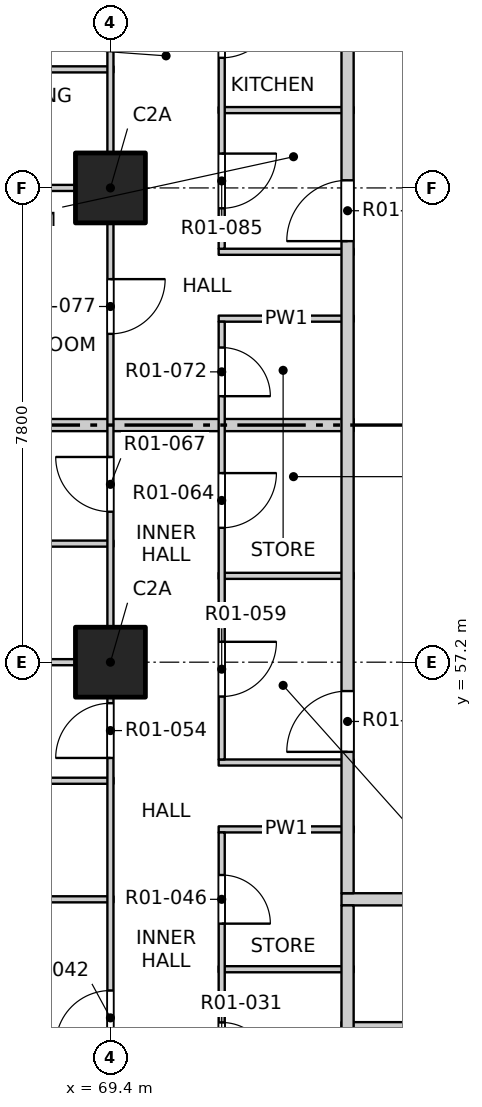
"""IFC4 building model, lengths in metres.
Left out: names, types, materials, properties, quantities, classifications, styles, units other than length and angle.
Written with IfcOpenShell. Run it as: python <this file> out.ifc"""

import sys

from ifc_helpers import new_model, si_unit, direction, frame, frame_2d, origin, origin_2d, place, context, subcontext, project, spatial, rectangle, extrude, element, fill, save


model = new_model("IFC4")
c1 = context("Model", 3, precision=1e-05, world=origin(), true_north=direction((0.0, 1.0)))
c2 = subcontext(c1, "Body", "Model", "MODEL_VIEW")
j1 = project(units=[si_unit("LENGTHUNIT", "METRE"), si_unit("PLANEANGLEUNIT", "RADIAN")], contexts=[c1])
p1 = place(None, origin())
s1 = spatial("IfcSite", under=j1, at=p1, CompositionType="ELEMENT")
p2 = place(p1, origin())
s2 = spatial("IfcBuilding", under=s1, at=p2, CompositionType="ELEMENT")
p3 = place(p2, frame((0.0, 0.0, 19.5)))
s3 = spatial("IfcBuildingStorey", under=s2, at=p3, CompositionType="ELEMENT", Elevation=19.5)
for number, where, z_axis, x_axis in (
    (1, (69.4, 57.2, -0.25), (0.0, 0.0, 1.0), (1.0, 0.0, 0.0)),
    (2, (69.4, 65.0, -0.25), (0.0, 0.0, 1.0), (1.0, 0.0, 0.0)),
):
    element("IfcColumn", number, at=place(p3, frame(where, z_axis=z_axis, x_axis=x_axis)), inside=s3, PredefinedType="COLUMN", context=c2, shape_type="SweptSolid", body=[
        extrude(rectangle(XDim=1.15, YDim=1.15, at=origin_2d()), origin(), (0.0, 0.0, 1.0), 3.4),
    ])
p4 = place(p3, frame((73.2, 51.23, 0.0), z_axis=(0.0, 0.0, 1.0), x_axis=(1.0, 0.0, 0.0)))
e3 = element("IfcWall", 3, at=p4, inside=s3, PredefinedType="PARTITIONING", context=c2, shape_type="SweptSolid", body=[
    extrude(rectangle(XDim=5.3, YDim=0.1, at=frame_2d((2.65, 0.0))), origin(), (0.0, 0.0, 1.0), 3.15),
])
p5 = place(p4, frame((1.05, 0.0, 0.0)))
e4 = element("IfcOpeningElement", 4, at=p5, cuts=e3, PredefinedType="OPENING", context=c2, shape_type="SweptSolid", body=[
    extrude(rectangle(XDim=0.8, YDim=2.1, at=frame_2d((0.4, 1.05))), frame((0.0, 0.06, 0.0), z_axis=(0.0, -1.0, 0.0), x_axis=(1.0, 0.0, 0.0)), (0.0, 0.0, 1.0), 0.12),
])
p6 = place(p4, frame((3.625, 0.0, 0.0)))
e5 = element("IfcOpeningElement", 5, at=p6, cuts=e3, PredefinedType="OPENING", context=c2, shape_type="SweptSolid", body=[
    extrude(rectangle(XDim=0.8, YDim=2.1, at=frame_2d((0.4, 1.05))), frame((0.0, 0.06, 0.0), z_axis=(0.0, -1.0, 0.0), x_axis=(1.0, 0.0, 0.0)), (0.0, 0.0, 1.0), 0.12),
])
p7 = place(p3, frame((71.18, 52.15, 0.0), z_axis=(0.0, 0.0, 1.0), x_axis=(1.0, 0.0, 0.0)))
e6 = element("IfcWall", 6, at=p7, inside=s3, PredefinedType="PARTITIONING", context=c2, shape_type="SweptSolid", body=[
    extrude(rectangle(XDim=2.22, YDim=0.1, at=frame_2d((1.11, 0.0))), origin(), (0.0, 0.0, 1.0), 3.15),
])
p8 = place(p3, frame((61.9, 53.3, 0.0), z_axis=(0.0, 0.0, 1.0), x_axis=(1.0, 0.0, 0.0)))
e7 = element("IfcWall", 7, at=p8, inside=s3, PredefinedType="PARTITIONING", context=c2, shape_type="SweptSolid", body=[
    extrude(rectangle(XDim=7.55, YDim=0.1, at=frame_2d((3.775, 0.0))), origin(), (0.0, 0.0, 1.0), 3.15),
])
p9 = place(p3, frame((73.2, 53.3, 0.0), z_axis=(0.0, 0.0, 1.0), x_axis=(1.0, 0.0, 0.0)))
e8 = element("IfcWall", 8, at=p9, inside=s3, PredefinedType="PARTITIONING", context=c2, shape_type="SweptSolid", body=[
    extrude(rectangle(XDim=23.6, YDim=0.2, at=frame_2d((11.8, 0.0))), origin(), (0.0, 0.0, 1.0), 3.15),
])
p10 = place(p9, frame((6.525, 0.0, 0.0)))
e9 = element("IfcOpeningElement", 9, at=p10, cuts=e8, PredefinedType="OPENING", context=c2, shape_type="SweptSolid", body=[
    extrude(rectangle(XDim=1.0, YDim=2.1, at=frame_2d((0.5, 1.05))), frame((0.0, 0.11, 0.0), z_axis=(0.0, -1.0, 0.0), x_axis=(1.0, 0.0, 0.0)), (0.0, 0.0, 1.0), 0.22),
])
p11 = place(p9, frame((18.275, 0.0, 0.0)))
e10 = element("IfcOpeningElement", 10, at=p11, cuts=e8, PredefinedType="OPENING", context=c2, shape_type="SweptSolid", body=[
    extrude(rectangle(XDim=1.0, YDim=2.1, at=frame_2d((0.5, 1.05))), frame((0.0, 0.11, 0.0), z_axis=(0.0, -1.0, 0.0), x_axis=(1.0, 0.0, 0.0)), (0.0, 0.0, 1.0), 0.22),
])
p12 = place(p3, frame((71.18, 54.45, 0.0), z_axis=(0.0, 0.0, 1.0), x_axis=(1.0, 0.0, 0.0)))
e11 = element("IfcWall", 11, at=p12, inside=s3, PredefinedType="PARTITIONING", context=c2, shape_type="SweptSolid", body=[
    extrude(rectangle(XDim=2.22, YDim=0.1, at=frame_2d((1.11, 0.0))), origin(), (0.0, 0.0, 1.0), 3.15),
])
p13 = place(p3, frame((65.75, 55.25, 0.0), z_axis=(0.0, 0.0, 1.0), x_axis=(1.0, 0.0, 0.0)))
e12 = element("IfcWall", 12, at=p13, inside=s3, PredefinedType="PARTITIONING", context=c2, shape_type="SweptSolid", body=[
    extrude(rectangle(XDim=3.7, YDim=0.1, at=frame_2d((1.85, 0.0))), origin(), (0.0, 0.0, 1.0), 3.15),
])
p14 = place(p3, frame((71.18, 55.55, 0.0), z_axis=(0.0, 0.0, 1.0), x_axis=(1.0, 0.0, 0.0)))
e13 = element("IfcWall", 13, at=p14, inside=s3, PredefinedType="PARTITIONING", context=c2, shape_type="SweptSolid", body=[
    extrude(rectangle(XDim=2.22, YDim=0.1, at=frame_2d((1.11, 0.0))), origin(), (0.0, 0.0, 1.0), 3.15),
])
p15 = place(p3, frame((61.9, 57.2, 0.0), z_axis=(0.0, 0.0, 1.0), x_axis=(1.0, 0.0, 0.0)))
e14 = element("IfcWall", 14, at=p15, inside=s3, PredefinedType="PARTITIONING", context=c2, shape_type="SweptSolid", body=[
    extrude(rectangle(XDim=7.55, YDim=0.1, at=frame_2d((3.775, 0.0))), origin(), (0.0, 0.0, 1.0), 2.55),
])
p16 = place(p3, frame((71.18, 58.62, 0.0), z_axis=(0.0, 0.0, 1.0), x_axis=(1.0, 0.0, 0.0)))
e15 = element("IfcWall", 15, at=p16, inside=s3, PredefinedType="PARTITIONING", context=c2, shape_type="SweptSolid", body=[
    extrude(rectangle(XDim=2.22, YDim=0.1, at=frame_2d((1.11, 0.0))), origin(), (0.0, 0.0, 1.0), 3.15),
])
p17 = place(p3, frame((65.75, 59.15, 0.0), z_axis=(0.0, 0.0, 1.0), x_axis=(1.0, 0.0, 0.0)))
e16 = element("IfcWall", 16, at=p17, inside=s3, PredefinedType="PARTITIONING", context=c2, shape_type="SweptSolid", body=[
    extrude(rectangle(XDim=3.7, YDim=0.1, at=frame_2d((1.85, 0.0))), origin(), (0.0, 0.0, 1.0), 3.15),
])
p18 = place(p3, frame((61.9, 61.1, 0.0), z_axis=(0.0, 0.0, 1.0), x_axis=(1.0, 0.0, 0.0)))
e17 = element("IfcWall", 17, at=p18, inside=s3, PredefinedType="PARTITIONING", context=c2, shape_type="SweptSolid", body=[
    extrude(rectangle(XDim=11.5, YDim=0.2, at=frame_2d((5.75, 0.0))), origin(), (0.0, 0.0, 1.0), 3.15),
])
for number, where, z_axis, x_axis in (
    (18, (71.18, 62.85, 0.0), (0.0, 0.0, 1.0), (1.0, 0.0, 0.0)),
    (19, (71.18, 63.95, 0.0), (0.0, 0.0, 1.0), (1.0, 0.0, 0.0)),
):
    element("IfcWall", number, at=place(p3, frame(where, z_axis=z_axis, x_axis=x_axis)), inside=s3, PredefinedType="PARTITIONING", context=c2, shape_type="SweptSolid", body=[
        extrude(rectangle(XDim=2.22, YDim=0.1, at=frame_2d((1.11, 0.0))), origin(), (0.0, 0.0, 1.0), 3.15),
    ])
p19 = place(p3, frame((61.9, 65.0, 0.0), z_axis=(0.0, 0.0, 1.0), x_axis=(1.0, 0.0, 0.0)))
e20 = element("IfcWall", 20, at=p19, inside=s3, PredefinedType="PARTITIONING", context=c2, shape_type="SweptSolid", body=[
    extrude(rectangle(XDim=7.55, YDim=0.1, at=frame_2d((3.775, 0.0))), origin(), (0.0, 0.0, 1.0), 2.55),
])
p20 = place(p3, frame((71.18, 66.28, 0.0), z_axis=(0.0, 0.0, 1.0), x_axis=(1.0, 0.0, 0.0)))
e21 = element("IfcWall", 21, at=p20, inside=s3, PredefinedType="PARTITIONING", context=c2, shape_type="SweptSolid", body=[
    extrude(rectangle(XDim=2.22, YDim=0.1, at=frame_2d((1.11, 0.0))), origin(), (0.0, 0.0, 1.0), 3.15),
])
p21 = place(p3, frame((66.05, 66.95, 0.0), z_axis=(0.0, 0.0, 1.0), x_axis=(1.0, 0.0, 0.0)))
e22 = element("IfcWall", 22, at=p21, inside=s3, PredefinedType="PARTITIONING", context=c2, shape_type="SweptSolid", body=[
    extrude(rectangle(XDim=3.4, YDim=0.1, at=frame_2d((1.7, 0.0))), origin(), (0.0, 0.0, 1.0), 3.15),
])
p22 = place(p3, frame((69.4, 49.4, 0.0), z_axis=(0.0, 0.0, 1.0), x_axis=(0.0, 1.0, 0.0)))
e23 = element("IfcWall", 23, at=p22, inside=s3, PredefinedType="PARTITIONING", context=c2, shape_type="SweptSolid", body=[
    extrude(rectangle(XDim=31.2, YDim=0.1, at=frame_2d((15.6, 0.0))), origin(), (0.0, 0.0, 1.0), 3.15),
])
p23 = place(p22, frame((1.5, 0.0, 0.0)))
e24 = element("IfcOpeningElement", 24, at=p23, cuts=e23, PredefinedType="OPENING", context=c2, shape_type="SweptSolid", body=[
    extrude(rectangle(XDim=0.9, YDim=2.1, at=frame_2d((0.45, 1.05))), frame((0.0, 0.06, 0.0), z_axis=(0.0, -1.0, 0.0), x_axis=(1.0, 0.0, 0.0)), (0.0, 0.0, 1.0), 0.12),
])
p24 = place(p22, frame((6.225, 0.0, 0.0)))
e25 = element("IfcOpeningElement", 25, at=p24, cuts=e23, PredefinedType="OPENING", context=c2, shape_type="SweptSolid", body=[
    extrude(rectangle(XDim=0.9, YDim=2.1, at=frame_2d((0.45, 1.05))), frame((0.0, 0.06, 0.0), z_axis=(0.0, -1.0, 0.0), x_axis=(1.0, 0.0, 0.0)), (0.0, 0.0, 1.0), 0.12),
])
p25 = place(p22, frame((10.275, 0.0, 0.0)))
e26 = element("IfcOpeningElement", 26, at=p25, cuts=e23, PredefinedType="OPENING", context=c2, shape_type="SweptSolid", body=[
    extrude(rectangle(XDim=0.9, YDim=2.1, at=frame_2d((0.45, 1.05))), frame((0.0, 0.06, 0.0), z_axis=(0.0, -1.0, 0.0), x_axis=(1.0, 0.0, 0.0)), (0.0, 0.0, 1.0), 0.12),
])
p26 = place(p22, frame((13.2, 0.0, 0.0)))
e27 = element("IfcOpeningElement", 27, at=p26, cuts=e23, PredefinedType="OPENING", context=c2, shape_type="SweptSolid", body=[
    extrude(rectangle(XDim=0.9, YDim=2.1, at=frame_2d((0.45, 1.05))), frame((0.0, 0.06, 0.0), z_axis=(0.0, -1.0, 0.0), x_axis=(1.0, 0.0, 0.0)), (0.0, 0.0, 1.0), 0.12),
])
p27 = place(p22, frame((18.075, 0.0, 0.0)))
e28 = element("IfcOpeningElement", 28, at=p27, cuts=e23, PredefinedType="OPENING", context=c2, shape_type="SweptSolid", body=[
    extrude(rectangle(XDim=0.9, YDim=2.1, at=frame_2d((0.45, 1.05))), frame((0.0, 0.06, 0.0), z_axis=(0.0, -1.0, 0.0), x_axis=(1.0, 0.0, 0.0)), (0.0, 0.0, 1.0), 0.12),
])
p28 = place(p22, frame((21.8, 0.0, 0.0)))
e29 = element("IfcOpeningElement", 29, at=p28, cuts=e23, PredefinedType="OPENING", context=c2, shape_type="SweptSolid", body=[
    extrude(rectangle(XDim=0.9, YDim=2.1, at=frame_2d((0.45, 1.05))), frame((0.0, 0.06, 0.0), z_axis=(0.0, -1.0, 0.0), x_axis=(1.0, 0.0, 0.0)), (0.0, 0.0, 1.0), 0.12),
])
p29 = place(p22, frame((24.9, 0.0, 0.0)))
e30 = element("IfcOpeningElement", 30, at=p29, cuts=e23, PredefinedType="OPENING", context=c2, shape_type="SweptSolid", body=[
    extrude(rectangle(XDim=0.9, YDim=2.1, at=frame_2d((0.45, 1.05))), frame((0.0, 0.06, 0.0), z_axis=(0.0, -1.0, 0.0), x_axis=(1.0, 0.0, 0.0)), (0.0, 0.0, 1.0), 0.12),
])
p30 = place(p22, frame((29.6, 0.0, 0.0)))
e31 = element("IfcOpeningElement", 31, at=p30, cuts=e23, PredefinedType="OPENING", context=c2, shape_type="SweptSolid", body=[
    extrude(rectangle(XDim=0.9, YDim=2.1, at=frame_2d((0.45, 1.05))), frame((0.0, 0.06, 0.0), z_axis=(0.0, -1.0, 0.0), x_axis=(1.0, 0.0, 0.0)), (0.0, 0.0, 1.0), 0.12),
])
p31 = place(p3, frame((71.23, 45.55, 0.0), z_axis=(0.0, 0.0, 1.0), x_axis=(0.0, 1.0, 0.0)))
e32 = element("IfcWall", 32, at=p31, inside=s3, PredefinedType="PARTITIONING", context=c2, shape_type="SweptSolid", body=[
    extrude(rectangle(XDim=8.85, YDim=0.1, at=frame_2d((4.425, 0.0))), origin(), (0.0, 0.0, 1.0), 3.15),
])
p32 = place(p31, frame((0.7, 0.0, 0.0)))
e33 = element("IfcOpeningElement", 33, at=p32, cuts=e32, PredefinedType="OPENING", context=c2, shape_type="SweptSolid", body=[
    extrude(rectangle(XDim=0.8, YDim=2.1, at=frame_2d((0.4, 1.05))), frame((0.0, 0.06, 0.0), z_axis=(0.0, -1.0, 0.0), x_axis=(1.0, 0.0, 0.0)), (0.0, 0.0, 1.0), 0.12),
])
p33 = place(p31, frame((2.7, 0.0, 0.0)))
e34 = element("IfcOpeningElement", 34, at=p33, cuts=e32, PredefinedType="OPENING", context=c2, shape_type="SweptSolid", body=[
    extrude(rectangle(XDim=0.9, YDim=2.1, at=frame_2d((0.45, 1.05))), frame((0.0, 0.06, 0.0), z_axis=(0.0, -1.0, 0.0), x_axis=(1.0, 0.0, 0.0)), (0.0, 0.0, 1.0), 0.12),
])
p34 = place(p31, frame((4.925, 0.0, 0.0)))
e35 = element("IfcOpeningElement", 35, at=p34, cuts=e32, PredefinedType="OPENING", context=c2, shape_type="SweptSolid", body=[
    extrude(rectangle(XDim=0.8, YDim=2.1, at=frame_2d((0.4, 1.05))), frame((0.0, 0.06, 0.0), z_axis=(0.0, -1.0, 0.0), x_axis=(1.0, 0.0, 0.0)), (0.0, 0.0, 1.0), 0.12),
])
p35 = place(p31, frame((7.35, 0.0, 0.0)))
e36 = element("IfcOpeningElement", 36, at=p35, cuts=e32, PredefinedType="OPENING", context=c2, shape_type="SweptSolid", body=[
    extrude(rectangle(XDim=0.8, YDim=2.1, at=frame_2d((0.4, 1.05))), frame((0.0, 0.06, 0.0), z_axis=(0.0, -1.0, 0.0), x_axis=(1.0, 0.0, 0.0)), (0.0, 0.0, 1.0), 0.12),
])
p36 = place(p3, frame((71.23, 55.6, 0.0), z_axis=(0.0, 0.0, 1.0), x_axis=(0.0, 1.0, 0.0)))
e37 = element("IfcWall", 37, at=p36, inside=s3, PredefinedType="PARTITIONING", context=c2, shape_type="SweptSolid", body=[
    extrude(rectangle(XDim=7.2, YDim=0.1, at=frame_2d((3.6, 0.0))), origin(), (0.0, 0.0, 1.0), 3.15),
])
p37 = place(p36, frame((1.035, 0.0, 0.0)))
e38 = element("IfcOpeningElement", 38, at=p37, cuts=e37, PredefinedType="OPENING", context=c2, shape_type="SweptSolid", body=[
    extrude(rectangle(XDim=0.9, YDim=2.1, at=frame_2d((0.45, 1.05))), frame((0.0, 0.06, 0.0), z_axis=(0.0, -1.0, 0.0), x_axis=(1.0, 0.0, 0.0)), (0.0, 0.0, 1.0), 0.12),
])
p38 = place(p36, frame((3.81, 0.0, 0.0)))
e39 = element("IfcOpeningElement", 39, at=p38, cuts=e37, PredefinedType="OPENING", context=c2, shape_type="SweptSolid", body=[
    extrude(rectangle(XDim=0.9, YDim=2.1, at=frame_2d((0.45, 1.05))), frame((0.0, 0.06, 0.0), z_axis=(0.0, -1.0, 0.0), x_axis=(1.0, 0.0, 0.0)), (0.0, 0.0, 1.0), 0.12),
])
p39 = place(p36, frame((5.975, 0.0, 0.0)))
e40 = element("IfcOpeningElement", 40, at=p39, cuts=e37, PredefinedType="OPENING", context=c2, shape_type="SweptSolid", body=[
    extrude(rectangle(XDim=0.8, YDim=2.1, at=frame_2d((0.4, 1.05))), frame((0.0, 0.06, 0.0), z_axis=(0.0, -1.0, 0.0), x_axis=(1.0, 0.0, 0.0)), (0.0, 0.0, 1.0), 0.12),
])
p40 = place(p3, frame((71.23, 64.0, 0.0), z_axis=(0.0, 0.0, 1.0), x_axis=(0.0, 1.0, 0.0)))
e41 = element("IfcWall", 41, at=p40, inside=s3, PredefinedType="PARTITIONING", context=c2, shape_type="SweptSolid", body=[
    extrude(rectangle(XDim=6.3, YDim=0.1, at=frame_2d((3.15, 0.0))), origin(), (0.0, 0.0, 1.0), 3.15),
])
p41 = place(p40, frame((0.665, 0.0, 0.0)))
e42 = element("IfcOpeningElement", 42, at=p41, cuts=e41, PredefinedType="OPENING", context=c2, shape_type="SweptSolid", body=[
    extrude(rectangle(XDim=0.9, YDim=2.1, at=frame_2d((0.45, 1.05))), frame((0.0, 0.06, 0.0), z_axis=(0.0, -1.0, 0.0), x_axis=(1.0, 0.0, 0.0)), (0.0, 0.0, 1.0), 0.12),
])
p42 = place(p40, frame((3.14, 0.0, 0.0)))
e43 = element("IfcOpeningElement", 43, at=p42, cuts=e41, PredefinedType="OPENING", context=c2, shape_type="SweptSolid", body=[
    extrude(rectangle(XDim=0.9, YDim=2.1, at=frame_2d((0.45, 1.05))), frame((0.0, 0.06, 0.0), z_axis=(0.0, -1.0, 0.0), x_axis=(1.0, 0.0, 0.0)), (0.0, 0.0, 1.0), 0.12),
])
p43 = place(p40, frame((5.175, 0.0, 0.0)))
e44 = element("IfcOpeningElement", 44, at=p43, cuts=e41, PredefinedType="OPENING", context=c2, shape_type="SweptSolid", body=[
    extrude(rectangle(XDim=0.9, YDim=2.1, at=frame_2d((0.45, 1.05))), frame((0.0, 0.06, 0.0), z_axis=(0.0, -1.0, 0.0), x_axis=(1.0, 0.0, 0.0)), (0.0, 0.0, 1.0), 0.12),
])
p44 = place(p3, frame((73.3, 41.9, 0.0), z_axis=(0.0, 0.0, 1.0), x_axis=(0.0, 1.0, 0.0)))
e45 = element("IfcWall", 45, at=p44, inside=s3, PredefinedType="PARTITIONING", context=c2, shape_type="SweptSolid", body=[
    extrude(rectangle(XDim=11.3, YDim=0.2, at=frame_2d((5.65, 0.0))), origin(), (0.0, 0.0, 1.0), 3.15),
])
p45 = place(p3, frame((73.3, 53.4, 0.0), z_axis=(0.0, 0.0, 1.0), x_axis=(0.0, 1.0, 0.0)))
e46 = element("IfcWall", 46, at=p45, inside=s3, PredefinedType="PARTITIONING", context=c2, shape_type="SweptSolid", body=[
    extrude(rectangle(XDim=31.0, YDim=0.2, at=frame_2d((15.5, 0.0))), origin(), (0.0, 0.0, 1.0), 3.15),
])
p46 = place(p45, frame((2.325, 0.0, 0.0)))
e47 = element("IfcOpeningElement", 47, at=p46, cuts=e46, PredefinedType="OPENING", context=c2, shape_type="SweptSolid", body=[
    extrude(rectangle(XDim=1.0, YDim=2.1, at=frame_2d((0.5, 1.05))), frame((0.0, 0.11, 0.0), z_axis=(0.0, -1.0, 0.0), x_axis=(1.0, 0.0, 0.0)), (0.0, 0.0, 1.0), 0.22),
])
p47 = place(p45, frame((10.725, 0.0, 0.0)))
e48 = element("IfcOpeningElement", 48, at=p47, cuts=e46, PredefinedType="OPENING", context=c2, shape_type="SweptSolid", body=[
    extrude(rectangle(XDim=1.0, YDim=2.1, at=frame_2d((0.5, 1.05))), frame((0.0, 0.11, 0.0), z_axis=(0.0, -1.0, 0.0), x_axis=(1.0, 0.0, 0.0)), (0.0, 0.0, 1.0), 0.22),
])
p48 = place(p45, frame((18.225, 0.0, 0.0)))
e49 = element("IfcOpeningElement", 49, at=p48, cuts=e46, PredefinedType="OPENING", context=c2, shape_type="SweptSolid", body=[
    extrude(rectangle(XDim=1.0, YDim=2.1, at=frame_2d((0.5, 1.05))), frame((0.0, 0.11, 0.0), z_axis=(0.0, -1.0, 0.0), x_axis=(1.0, 0.0, 0.0)), (0.0, 0.0, 1.0), 0.22),
])
p49 = place(p45, frame((25.925, 0.0, 0.0)))
e50 = element("IfcOpeningElement", 50, at=p49, cuts=e46, PredefinedType="OPENING", context=c2, shape_type="SweptSolid", body=[
    extrude(rectangle(XDim=1.0, YDim=2.1, at=frame_2d((0.5, 1.05))), frame((0.0, 0.11, 0.0), z_axis=(0.0, -1.0, 0.0), x_axis=(1.0, 0.0, 0.0)), (0.0, 0.0, 1.0), 0.22),
])
p50 = place(p34, origin())
e51 = element("IfcDoor", 51, at=p50, inside=s3, OperationType="SINGLE_SWING_RIGHT", PredefinedType="DOOR", context=c2, shape_type="SweptSolid", body=[
    extrude(rectangle(XDim=0.8, YDim=2.1, at=frame_2d((0.4, 1.05))), frame((0.0, 0.025, 0.0), z_axis=(0.0, -1.0, 0.0), x_axis=(1.0, 0.0, 0.0)), (0.0, 0.0, 1.0), 0.05),
])
fill(e35, e51)
p51 = place(p23, origin())
e52 = element("IfcDoor", 52, at=p51, inside=s3, OperationType="SINGLE_SWING_LEFT", PredefinedType="DOOR", context=c2, shape_type="SweptSolid", body=[
    extrude(rectangle(XDim=0.9, YDim=2.1, at=frame_2d((0.45, 1.05))), frame((0.0, 0.025, 0.0), z_axis=(0.0, -1.0, 0.0), x_axis=(1.0, 0.0, 0.0)), (0.0, 0.0, 1.0), 0.05),
])
fill(e24, e52)
p52 = place(p35, origin())
e53 = element("IfcDoor", 53, at=p52, inside=s3, OperationType="SINGLE_SWING_RIGHT", PredefinedType="DOOR", context=c2, shape_type="SweptSolid", body=[
    extrude(rectangle(XDim=0.8, YDim=2.1, at=frame_2d((0.4, 1.05))), frame((0.0, 0.025, 0.0), z_axis=(0.0, -1.0, 0.0), x_axis=(1.0, 0.0, 0.0)), (0.0, 0.0, 1.0), 0.05),
])
fill(e36, e53)
p53 = place(p24, origin())
e54 = element("IfcDoor", 54, at=p53, inside=s3, OperationType="SINGLE_SWING_LEFT", PredefinedType="DOOR", context=c2, shape_type="SweptSolid", body=[
    extrude(rectangle(XDim=0.9, YDim=2.1, at=frame_2d((0.45, 1.05))), frame((0.0, 0.025, 0.0), z_axis=(0.0, -1.0, 0.0), x_axis=(1.0, 0.0, 0.0)), (0.0, 0.0, 1.0), 0.05),
])
fill(e25, e54)
p54 = place(p46, origin())
e55 = element("IfcDoor", 55, at=p54, inside=s3, OperationType="SINGLE_SWING_RIGHT", PredefinedType="DOOR", context=c2, shape_type="SweptSolid", body=[
    extrude(rectangle(XDim=1.0, YDim=2.1, at=frame_2d((0.5, 1.05))), frame((0.0, 0.025, 0.0), z_axis=(0.0, -1.0, 0.0), x_axis=(1.0, 0.0, 0.0)), (0.0, 0.0, 1.0), 0.05),
])
fill(e47, e55)
p55 = place(p37, origin())
e56 = element("IfcDoor", 56, at=p55, inside=s3, OperationType="SINGLE_SWING_LEFT", PredefinedType="DOOR", context=c2, shape_type="SweptSolid", body=[
    extrude(rectangle(XDim=0.9, YDim=2.1, at=frame_2d((0.45, 1.05))), frame((0.0, 0.025, 0.0), z_axis=(0.0, -1.0, 0.0), x_axis=(1.0, 0.0, 0.0)), (0.0, 0.0, 1.0), 0.05),
])
fill(e38, e56)
p56 = place(p38, origin())
e57 = element("IfcDoor", 57, at=p56, inside=s3, OperationType="SINGLE_SWING_LEFT", PredefinedType="DOOR", context=c2, shape_type="SweptSolid", body=[
    extrude(rectangle(XDim=0.9, YDim=2.1, at=frame_2d((0.45, 1.05))), frame((0.0, 0.025, 0.0), z_axis=(0.0, -1.0, 0.0), x_axis=(1.0, 0.0, 0.0)), (0.0, 0.0, 1.0), 0.05),
])
fill(e39, e57)
p57 = place(p25, origin())
e58 = element("IfcDoor", 58, at=p57, inside=s3, OperationType="SINGLE_SWING_RIGHT", PredefinedType="DOOR", context=c2, shape_type="SweptSolid", body=[
    extrude(rectangle(XDim=0.9, YDim=2.1, at=frame_2d((0.45, 1.05))), frame((0.0, 0.025, 0.0), z_axis=(0.0, -1.0, 0.0), x_axis=(1.0, 0.0, 0.0)), (0.0, 0.0, 1.0), 0.05),
])
fill(e26, e58)
p58 = place(p39, origin())
e59 = element("IfcDoor", 59, at=p58, inside=s3, OperationType="SINGLE_SWING_RIGHT", PredefinedType="DOOR", context=c2, shape_type="SweptSolid", body=[
    extrude(rectangle(XDim=0.8, YDim=2.1, at=frame_2d((0.4, 1.05))), frame((0.0, 0.025, 0.0), z_axis=(0.0, -1.0, 0.0), x_axis=(1.0, 0.0, 0.0)), (0.0, 0.0, 1.0), 0.05),
])
fill(e40, e59)
p59 = place(p26, origin())
e60 = element("IfcDoor", 60, at=p59, inside=s3, OperationType="SINGLE_SWING_LEFT", PredefinedType="DOOR", context=c2, shape_type="SweptSolid", body=[
    extrude(rectangle(XDim=0.9, YDim=2.1, at=frame_2d((0.45, 1.05))), frame((0.0, 0.025, 0.0), z_axis=(0.0, -1.0, 0.0), x_axis=(1.0, 0.0, 0.0)), (0.0, 0.0, 1.0), 0.05),
])
fill(e27, e60)
p60 = place(p47, origin())
e61 = element("IfcDoor", 61, at=p60, inside=s3, OperationType="SINGLE_SWING_RIGHT", PredefinedType="DOOR", context=c2, shape_type="SweptSolid", body=[
    extrude(rectangle(XDim=1.0, YDim=2.1, at=frame_2d((0.5, 1.05))), frame((0.0, 0.025, 0.0), z_axis=(0.0, -1.0, 0.0), x_axis=(1.0, 0.0, 0.0)), (0.0, 0.0, 1.0), 0.05),
])
fill(e48, e61)
p61 = place(p41, origin())
e62 = element("IfcDoor", 62, at=p61, inside=s3, OperationType="SINGLE_SWING_LEFT", PredefinedType="DOOR", context=c2, shape_type="SweptSolid", body=[
    extrude(rectangle(XDim=0.9, YDim=2.1, at=frame_2d((0.45, 1.05))), frame((0.0, 0.025, 0.0), z_axis=(0.0, -1.0, 0.0), x_axis=(1.0, 0.0, 0.0)), (0.0, 0.0, 1.0), 0.05),
])
fill(e42, e62)
p62 = place(p42, origin())
e63 = element("IfcDoor", 63, at=p62, inside=s3, OperationType="SINGLE_SWING_LEFT", PredefinedType="DOOR", context=c2, shape_type="SweptSolid", body=[
    extrude(rectangle(XDim=0.9, YDim=2.1, at=frame_2d((0.45, 1.05))), frame((0.0, 0.025, 0.0), z_axis=(0.0, -1.0, 0.0), x_axis=(1.0, 0.0, 0.0)), (0.0, 0.0, 1.0), 0.05),
])
fill(e43, e63)
save(model, sys.argv[1])
